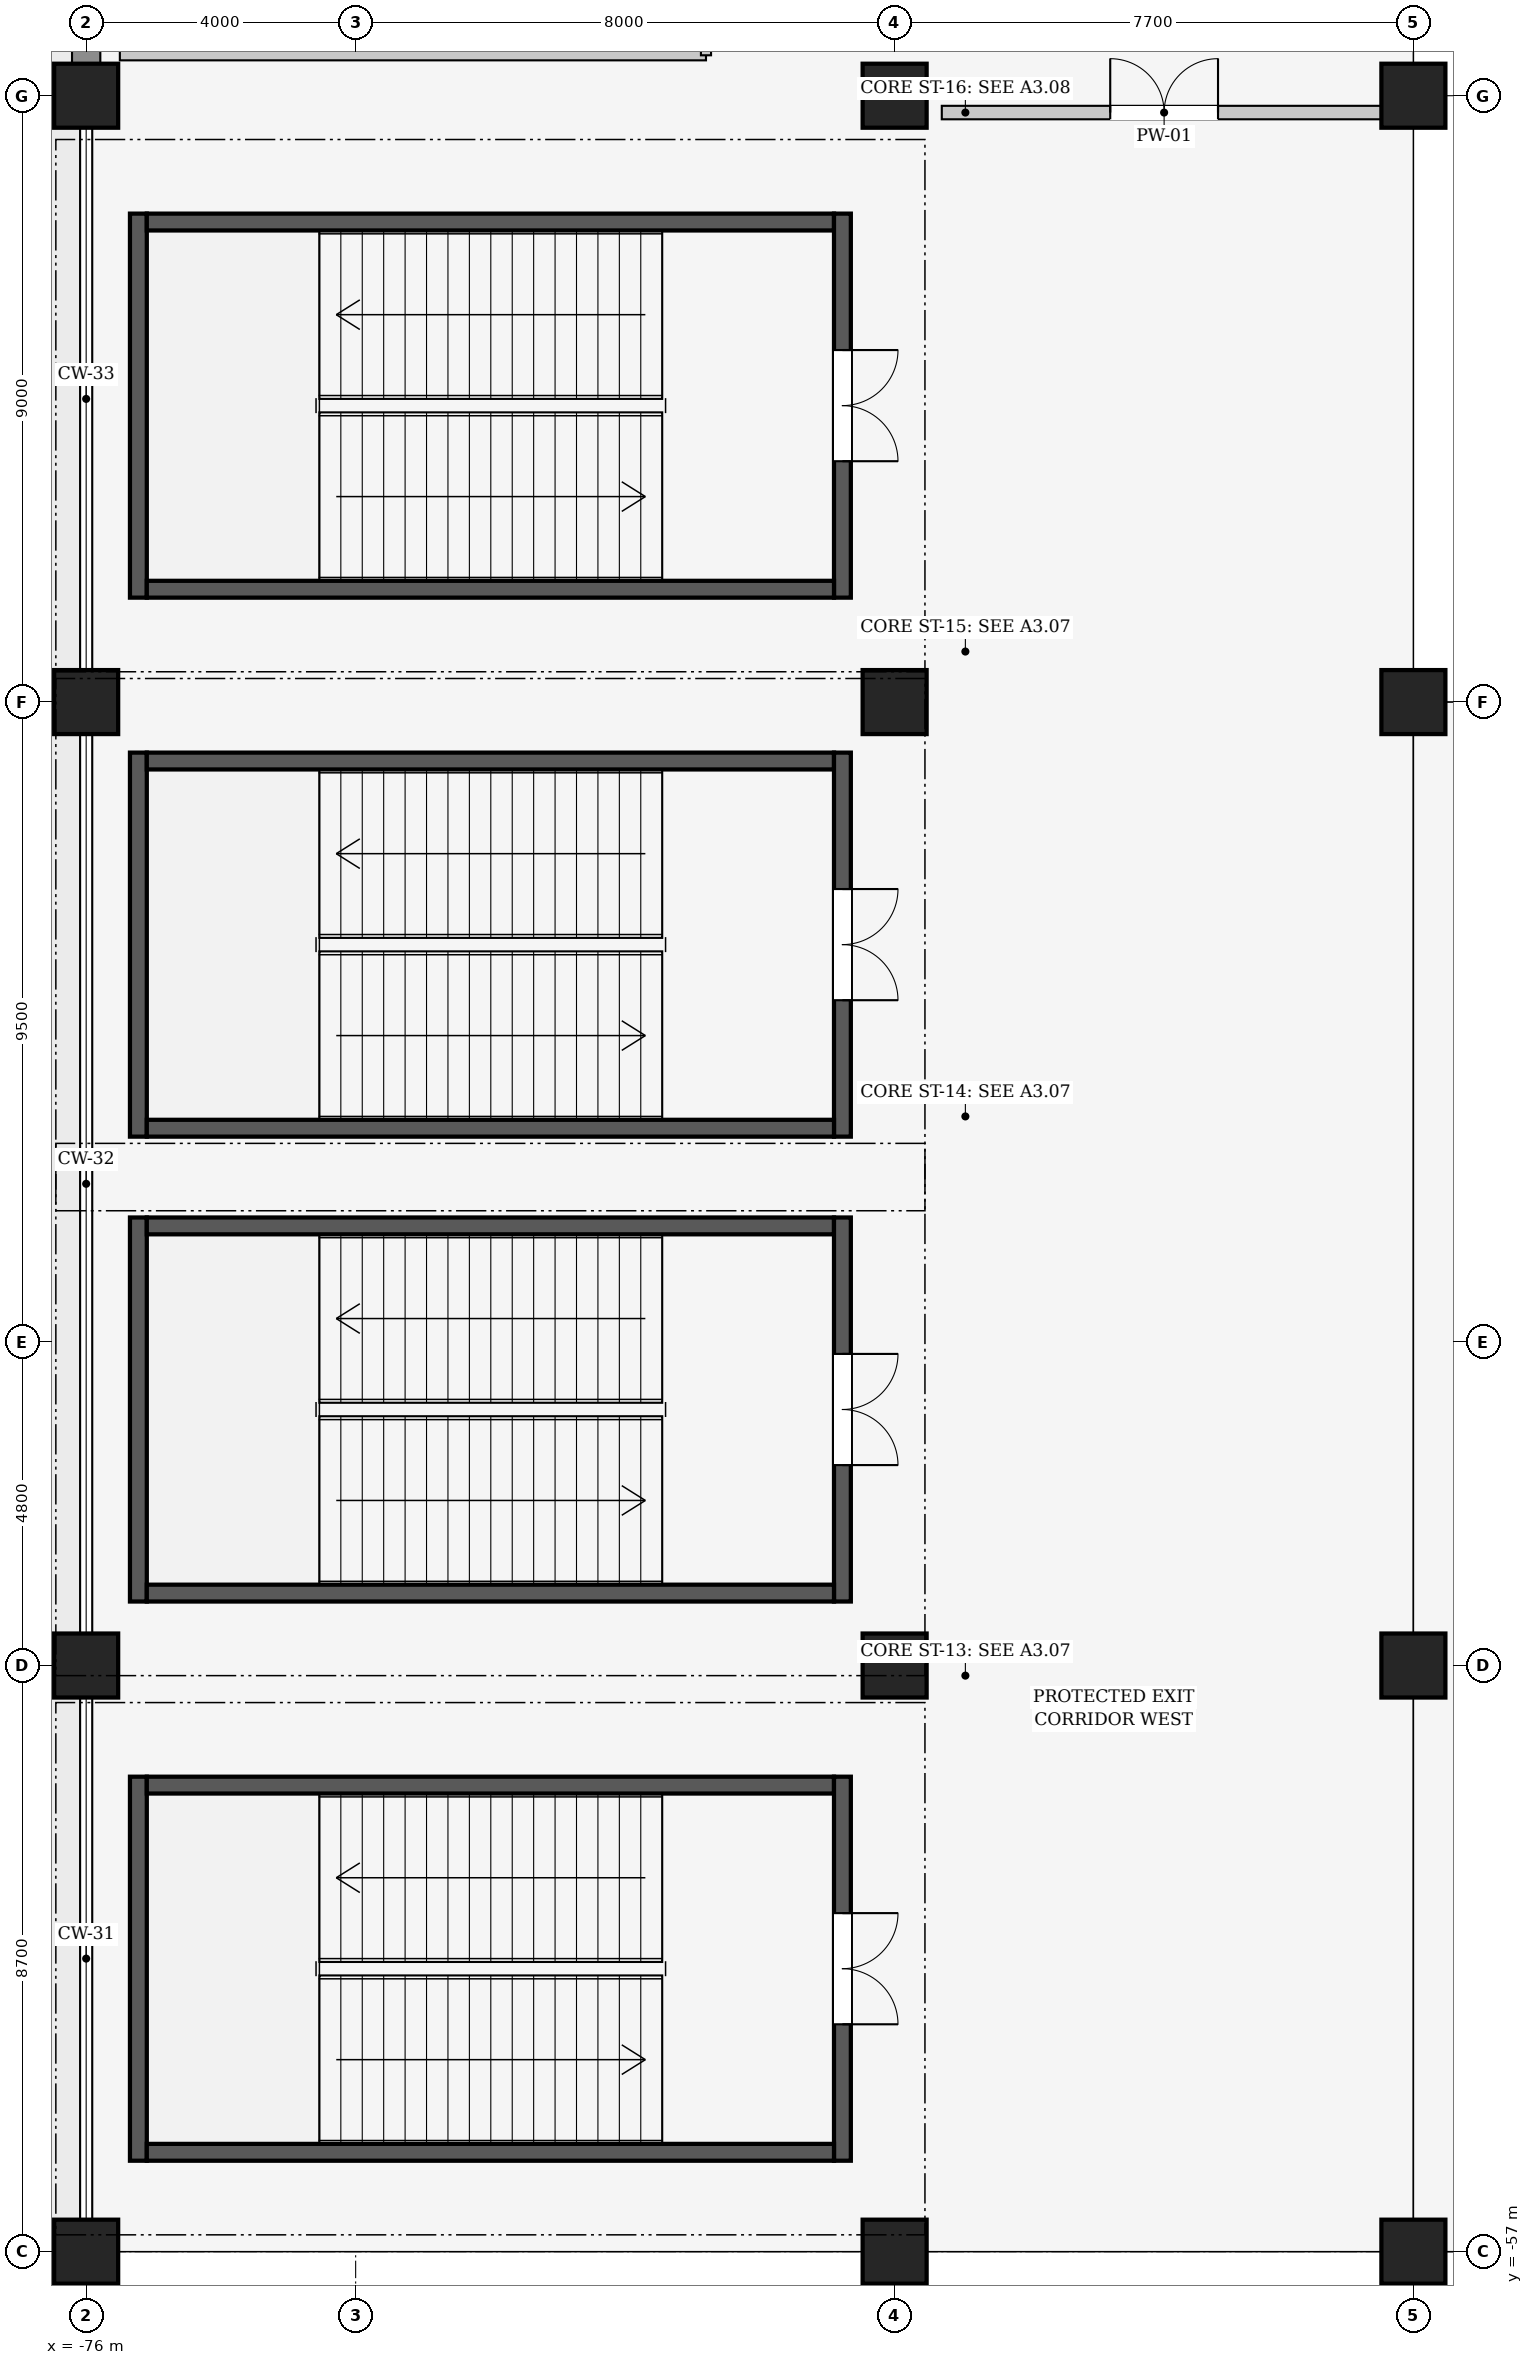
"""IFC4 building model, lengths in metres.
Left out: names, types, materials, properties, quantities, classifications, styles, units other than length and angle.
Written with IfcOpenShell. Run it as: python <this file> out.ifc"""

import sys

from ifc_helpers import new_model, si_unit, direction, frame, frame_2d, origin, origin_2d, place, context, subcontext, project, spatial, rectangle, extrude, element, fill, save


model = new_model("IFC4")
c1 = context("Model", 3, precision=1e-05, world=origin(), true_north=direction((0.0, 1.0)))
c2 = subcontext(c1, "Body", "Model", "MODEL_VIEW")
j1 = project(units=[si_unit("LENGTHUNIT", "METRE"), si_unit("PLANEANGLEUNIT", "RADIAN")], contexts=[c1])
p1 = place(None, origin())
s1 = spatial("IfcSite", under=j1, at=p1, CompositionType="ELEMENT")
p2 = place(p1, origin())
s2 = spatial("IfcBuilding", under=s1, at=p2, CompositionType="ELEMENT")
p3 = place(p2, origin())
s3 = spatial("IfcBuildingStorey", under=s2, at=p3, CompositionType="ELEMENT", Elevation=0.0)
for number, where, z_axis, x_axis in (
    (1, (-76.0, -57.0, 0.0), (0.0, 0.0, 1.0), (1.0, 0.0, 0.0)),
    (2, (-76.0, -48.3, 0.0), (0.0, 0.0, 1.0), (1.0, 0.0, 0.0)),
    (3, (-76.0, -34.0, 0.0), (0.0, 0.0, 1.0), (1.0, 0.0, 0.0)),
    (4, (-76.0, -25.0, 0.0), (0.0, 0.0, 1.0), (1.0, 0.0, 0.0)),
    (5, (-64.0, -57.0, 0.0), (0.0, 0.0, 1.0), (1.0, 0.0, 0.0)),
    (6, (-64.0, -48.3, 0.0), (0.0, 0.0, 1.0), (1.0, 0.0, 0.0)),
    (7, (-64.0, -34.0, 0.0), (0.0, 0.0, 1.0), (1.0, 0.0, 0.0)),
    (8, (-64.0, -25.0, 0.0), (0.0, 0.0, 1.0), (1.0, 0.0, 0.0)),
    (9, (-56.3, -57.0, 0.0), (0.0, 0.0, 1.0), (1.0, 0.0, 0.0)),
    (10, (-56.3, -48.3, 0.0), (0.0, 0.0, 1.0), (1.0, 0.0, 0.0)),
    (11, (-56.3, -34.0, 0.0), (0.0, 0.0, 1.0), (1.0, 0.0, 0.0)),
    (12, (-56.3, -25.0, 0.0), (0.0, 0.0, 1.0), (1.0, 0.0, 0.0)),
):
    element("IfcColumn", number, at=place(p3, frame(where, z_axis=z_axis, x_axis=x_axis)), inside=s3, PredefinedType="COLUMN", context=c2, shape_type="SweptSolid", body=[
        extrude(rectangle(XDim=0.95, YDim=0.95, at=origin_2d()), origin(), (0.0, 0.0, 1.0), 6.0),
    ])
p4 = place(p3, frame((-76.0, -24.543, 0.0), z_axis=(0.0, 0.0, 1.0), x_axis=(0.0, 1.0, 0.0)))
e13 = element("IfcWall", 13, at=p4, inside=s3, PredefinedType="SOLIDWALL", context=c2, shape_type="SweptSolid", body=[
    extrude(rectangle(XDim=7.086, YDim=0.42, at=frame_2d((3.543, 0.0))), origin(), (0.0, 0.0, 1.0), 4.74),
])
p5 = place(p4, frame((2.343, 0.0, 0.0)))
e14 = element("IfcOpeningElement", 14, at=p5, cuts=e13, PredefinedType="OPENING", context=c2, shape_type="SweptSolid", body=[
    extrude(rectangle(XDim=2.4, YDim=3.0, at=frame_2d((1.2, 1.5))), frame((0.0, 0.22, 0.0), z_axis=(0.0, -1.0, 0.0), x_axis=(1.0, 0.0, 0.0)), (0.0, 0.0, 1.0), 0.44),
])
p6 = place(p3, frame((-75.225, -55.65, 0.0), z_axis=(0.0, 0.0, 1.0), x_axis=(0.0, 1.0, 0.0)))
e15 = element("IfcWall", 15, at=p6, inside=s3, PredefinedType="SHEAR", context=c2, shape_type="SweptSolid", body=[
    extrude(rectangle(XDim=5.7, YDim=0.25, at=frame_2d((2.85, 0.0))), origin(), (0.0, 0.0, 1.0), 6.0),
])
p7 = place(p3, frame((-75.1, -50.075, 0.0), z_axis=(0.0, 0.0, 1.0), x_axis=(1.0, 0.0, 0.0)))
e16 = element("IfcWall", 16, at=p7, inside=s3, PredefinedType="SHEAR", context=c2, shape_type="SweptSolid", body=[
    extrude(rectangle(XDim=10.2, YDim=0.25, at=frame_2d((5.1, 0.0))), origin(), (0.0, 0.0, 1.0), 6.0),
])
p8 = place(p3, frame((-64.775, -49.95, 0.0), z_axis=(0.0, 0.0, 1.0), x_axis=(0.0, -1.0, 0.0)))
e17 = element("IfcWall", 17, at=p8, inside=s3, PredefinedType="SHEAR", context=c2, shape_type="SweptSolid", body=[
    extrude(rectangle(XDim=5.7, YDim=0.25, at=frame_2d((2.85, 0.0))), origin(), (0.0, 0.0, 1.0), 6.0),
])
p9 = place(p8, frame((2.025, 0.0, 0.0)))
e18 = element("IfcOpeningElement", 18, at=p9, cuts=e17, PredefinedType="OPENING", context=c2, shape_type="SweptSolid", body=[
    extrude(rectangle(XDim=1.65, YDim=2.2, at=frame_2d((0.825, 1.1))), frame((0.0, 0.135, 0.0), z_axis=(0.0, -1.0, 0.0), x_axis=(1.0, 0.0, 0.0)), (0.0, 0.0, 1.0), 0.27),
])
p10 = place(p3, frame((-64.9, -55.525, 0.0), z_axis=(0.0, 0.0, 1.0), x_axis=(-1.0, 0.0, 0.0)))
e19 = element("IfcWall", 19, at=p10, inside=s3, PredefinedType="SHEAR", context=c2, shape_type="SweptSolid", body=[
    extrude(rectangle(XDim=10.2, YDim=0.25, at=frame_2d((5.1, 0.0))), origin(), (0.0, 0.0, 1.0), 6.0),
])
p11 = place(p3, frame((-75.225, -47.35, 0.0), z_axis=(0.0, 0.0, 1.0), x_axis=(0.0, 1.0, 0.0)))
e20 = element("IfcWall", 20, at=p11, inside=s3, PredefinedType="SHEAR", context=c2, shape_type="SweptSolid", body=[
    extrude(rectangle(XDim=5.7, YDim=0.25, at=frame_2d((2.85, 0.0))), origin(), (0.0, 0.0, 1.0), 6.0),
])
p12 = place(p3, frame((-75.1, -41.775, 0.0), z_axis=(0.0, 0.0, 1.0), x_axis=(1.0, 0.0, 0.0)))
e21 = element("IfcWall", 21, at=p12, inside=s3, PredefinedType="SHEAR", context=c2, shape_type="SweptSolid", body=[
    extrude(rectangle(XDim=10.2, YDim=0.25, at=frame_2d((5.1, 0.0))), origin(), (0.0, 0.0, 1.0), 6.0),
])
p13 = place(p3, frame((-64.775, -41.65, 0.0), z_axis=(0.0, 0.0, 1.0), x_axis=(0.0, -1.0, 0.0)))
e22 = element("IfcWall", 22, at=p13, inside=s3, PredefinedType="SHEAR", context=c2, shape_type="SweptSolid", body=[
    extrude(rectangle(XDim=5.7, YDim=0.25, at=frame_2d((2.85, 0.0))), origin(), (0.0, 0.0, 1.0), 6.0),
])
p14 = place(p13, frame((2.025, 0.0, 0.0)))
e23 = element("IfcOpeningElement", 23, at=p14, cuts=e22, PredefinedType="OPENING", context=c2, shape_type="SweptSolid", body=[
    extrude(rectangle(XDim=1.65, YDim=2.2, at=frame_2d((0.825, 1.1))), frame((0.0, 0.135, 0.0), z_axis=(0.0, -1.0, 0.0), x_axis=(1.0, 0.0, 0.0)), (0.0, 0.0, 1.0), 0.27),
])
p15 = place(p3, frame((-64.9, -47.225, 0.0), z_axis=(0.0, 0.0, 1.0), x_axis=(-1.0, 0.0, 0.0)))
e24 = element("IfcWall", 24, at=p15, inside=s3, PredefinedType="SHEAR", context=c2, shape_type="SweptSolid", body=[
    extrude(rectangle(XDim=10.2, YDim=0.25, at=frame_2d((5.1, 0.0))), origin(), (0.0, 0.0, 1.0), 6.0),
])
p16 = place(p3, frame((-75.225, -40.45, 0.0), z_axis=(0.0, 0.0, 1.0), x_axis=(0.0, 1.0, 0.0)))
e25 = element("IfcWall", 25, at=p16, inside=s3, PredefinedType="SHEAR", context=c2, shape_type="SweptSolid", body=[
    extrude(rectangle(XDim=5.7, YDim=0.25, at=frame_2d((2.85, 0.0))), origin(), (0.0, 0.0, 1.0), 6.0),
])
p17 = place(p3, frame((-75.1, -34.875, 0.0), z_axis=(0.0, 0.0, 1.0), x_axis=(1.0, 0.0, 0.0)))
e26 = element("IfcWall", 26, at=p17, inside=s3, PredefinedType="SHEAR", context=c2, shape_type="SweptSolid", body=[
    extrude(rectangle(XDim=10.2, YDim=0.25, at=frame_2d((5.1, 0.0))), origin(), (0.0, 0.0, 1.0), 6.0),
])
p18 = place(p3, frame((-64.775, -34.75, 0.0), z_axis=(0.0, 0.0, 1.0), x_axis=(0.0, -1.0, 0.0)))
e27 = element("IfcWall", 27, at=p18, inside=s3, PredefinedType="SHEAR", context=c2, shape_type="SweptSolid", body=[
    extrude(rectangle(XDim=5.7, YDim=0.25, at=frame_2d((2.85, 0.0))), origin(), (0.0, 0.0, 1.0), 6.0),
])
p19 = place(p18, frame((2.025, 0.0, 0.0)))
e28 = element("IfcOpeningElement", 28, at=p19, cuts=e27, PredefinedType="OPENING", context=c2, shape_type="SweptSolid", body=[
    extrude(rectangle(XDim=1.65, YDim=2.2, at=frame_2d((0.825, 1.1))), frame((0.0, 0.135, 0.0), z_axis=(0.0, -1.0, 0.0), x_axis=(1.0, 0.0, 0.0)), (0.0, 0.0, 1.0), 0.27),
])
p20 = place(p3, frame((-64.9, -40.325, 0.0), z_axis=(0.0, 0.0, 1.0), x_axis=(-1.0, 0.0, 0.0)))
e29 = element("IfcWall", 29, at=p20, inside=s3, PredefinedType="SHEAR", context=c2, shape_type="SweptSolid", body=[
    extrude(rectangle(XDim=10.2, YDim=0.25, at=frame_2d((5.1, 0.0))), origin(), (0.0, 0.0, 1.0), 6.0),
])
p21 = place(p3, frame((-75.225, -32.45, 0.0), z_axis=(0.0, 0.0, 1.0), x_axis=(0.0, 1.0, 0.0)))
e30 = element("IfcWall", 30, at=p21, inside=s3, PredefinedType="SHEAR", context=c2, shape_type="SweptSolid", body=[
    extrude(rectangle(XDim=5.7, YDim=0.25, at=frame_2d((2.85, 0.0))), origin(), (0.0, 0.0, 1.0), 6.0),
])
p22 = place(p3, frame((-75.1, -26.875, 0.0), z_axis=(0.0, 0.0, 1.0), x_axis=(1.0, 0.0, 0.0)))
e31 = element("IfcWall", 31, at=p22, inside=s3, PredefinedType="SHEAR", context=c2, shape_type="SweptSolid", body=[
    extrude(rectangle(XDim=10.2, YDim=0.25, at=frame_2d((5.1, 0.0))), origin(), (0.0, 0.0, 1.0), 6.0),
])
p23 = place(p3, frame((-64.775, -26.75, 0.0), z_axis=(0.0, 0.0, 1.0), x_axis=(0.0, -1.0, 0.0)))
e32 = element("IfcWall", 32, at=p23, inside=s3, PredefinedType="SHEAR", context=c2, shape_type="SweptSolid", body=[
    extrude(rectangle(XDim=5.7, YDim=0.25, at=frame_2d((2.85, 0.0))), origin(), (0.0, 0.0, 1.0), 6.0),
])
p24 = place(p23, frame((2.025, 0.0, 0.0)))
e33 = element("IfcOpeningElement", 33, at=p24, cuts=e32, PredefinedType="OPENING", context=c2, shape_type="SweptSolid", body=[
    extrude(rectangle(XDim=1.65, YDim=2.2, at=frame_2d((0.825, 1.1))), frame((0.0, 0.135, 0.0), z_axis=(0.0, -1.0, 0.0), x_axis=(1.0, 0.0, 0.0)), (0.0, 0.0, 1.0), 0.27),
])
p25 = place(p3, frame((-64.9, -32.325, 0.0), z_axis=(0.0, 0.0, 1.0), x_axis=(-1.0, 0.0, 0.0)))
e34 = element("IfcWall", 34, at=p25, inside=s3, PredefinedType="SHEAR", context=c2, shape_type="SweptSolid", body=[
    extrude(rectangle(XDim=10.2, YDim=0.25, at=frame_2d((5.1, 0.0))), origin(), (0.0, 0.0, 1.0), 6.0),
])
p26 = place(p3, frame((-66.8, -24.4, 0.0), z_axis=(0.0, 0.0, 1.0), x_axis=(-1.0, 0.0, 0.0)))
e35 = element("IfcWall", 35, at=p26, inside=s3, PredefinedType="PARTITIONING", context=c2, shape_type="SweptSolid", body=[
    extrude(rectangle(XDim=8.7, YDim=0.15, at=frame_2d((4.35, 0.0))), origin(), (0.0, 0.0, 1.0), 5.64),
])
p27 = place(p3, frame((-66.8, -15.0, 0.0), z_axis=(0.0, 0.0, 1.0), x_axis=(0.0, -1.0, 0.0)))
e36 = element("IfcWall", 36, at=p27, inside=s3, PredefinedType="PARTITIONING", context=c2, shape_type="SweptSolid", body=[
    extrude(rectangle(XDim=9.4, YDim=0.15, at=frame_2d((4.7, 0.0))), origin(), (0.0, 0.0, 1.0), 4.725),
])
p28 = place(p27, frame((3.8, 0.0, 0.0)))
e37 = element("IfcOpeningElement", 37, at=p28, cuts=e36, PredefinedType="OPENING", context=c2, shape_type="SweptSolid", body=[
    extrude(rectangle(XDim=1.8, YDim=2.2, at=frame_2d((0.9, 1.1))), frame((0.0, 0.085, 0.0), z_axis=(0.0, -1.0, 0.0), x_axis=(1.0, 0.0, 0.0)), (0.0, 0.0, 1.0), 0.17),
])
p29 = place(p3, frame((-63.3, -25.25, 0.0), z_axis=(0.0, 0.0, 1.0), x_axis=(1.0, 0.0, 0.0)))
e38 = element("IfcWall", 38, at=p29, inside=s3, PredefinedType="PARTITIONING", context=c2, shape_type="SweptSolid", body=[
    extrude(rectangle(XDim=6.6, YDim=0.2, at=frame_2d((3.3, 0.0))), origin(), (0.0, 0.0, 1.0), 4.925),
])
p30 = place(p29, frame((2.5, 0.0, 0.0)))
e39 = element("IfcOpeningElement", 39, at=p30, cuts=e38, PredefinedType="OPENING", context=c2, shape_type="SweptSolid", body=[
    extrude(rectangle(XDim=1.6, YDim=2.2, at=frame_2d((0.8, 1.1))), frame((0.0, 0.11, 0.0), z_axis=(0.0, -1.0, 0.0), x_axis=(1.0, 0.0, 0.0)), (0.0, 0.0, 1.0), 0.22),
])
p31 = place(p9, origin())
e40 = element("IfcDoor", 40, at=p31, inside=s3, OperationType="DOUBLE_DOOR_SINGLE_SWING", PredefinedType="DOOR", context=c2, shape_type="SweptSolid", body=[
    extrude(rectangle(XDim=1.65, YDim=2.2, at=frame_2d((0.825, 1.1))), frame((0.0, 0.025, 0.0), z_axis=(0.0, -1.0, 0.0), x_axis=(1.0, 0.0, 0.0)), (0.0, 0.0, 1.0), 0.05),
])
fill(e18, e40)
p32 = place(p14, origin())
e41 = element("IfcDoor", 41, at=p32, inside=s3, OperationType="DOUBLE_DOOR_SINGLE_SWING", PredefinedType="DOOR", context=c2, shape_type="SweptSolid", body=[
    extrude(rectangle(XDim=1.65, YDim=2.2, at=frame_2d((0.825, 1.1))), frame((0.0, 0.025, 0.0), z_axis=(0.0, -1.0, 0.0), x_axis=(1.0, 0.0, 0.0)), (0.0, 0.0, 1.0), 0.05),
])
fill(e23, e41)
p33 = place(p19, origin())
e42 = element("IfcDoor", 42, at=p33, inside=s3, OperationType="DOUBLE_DOOR_SINGLE_SWING", PredefinedType="DOOR", context=c2, shape_type="SweptSolid", body=[
    extrude(rectangle(XDim=1.65, YDim=2.2, at=frame_2d((0.825, 1.1))), frame((0.0, 0.025, 0.0), z_axis=(0.0, -1.0, 0.0), x_axis=(1.0, 0.0, 0.0)), (0.0, 0.0, 1.0), 0.05),
])
fill(e28, e42)
p34 = place(p24, origin())
e43 = element("IfcDoor", 43, at=p34, inside=s3, OperationType="DOUBLE_DOOR_SINGLE_SWING", PredefinedType="DOOR", context=c2, shape_type="SweptSolid", body=[
    extrude(rectangle(XDim=1.65, YDim=2.2, at=frame_2d((0.825, 1.1))), frame((0.0, 0.025, 0.0), z_axis=(0.0, -1.0, 0.0), x_axis=(1.0, 0.0, 0.0)), (0.0, 0.0, 1.0), 0.05),
])
fill(e33, e43)
p35 = place(p30, origin())
e44 = element("IfcDoor", 44, at=p35, inside=s3, OperationType="DOUBLE_DOOR_SINGLE_SWING", PredefinedType="DOOR", context=c2, shape_type="SweptSolid", body=[
    extrude(rectangle(XDim=1.6, YDim=2.2, at=frame_2d((0.8, 1.1))), frame((0.0, 0.025, 0.0), z_axis=(0.0, -1.0, 0.0), x_axis=(1.0, 0.0, 0.0)), (0.0, 0.0, 1.0), 0.05),
])
fill(e39, e44)
save(model, sys.argv[1])
